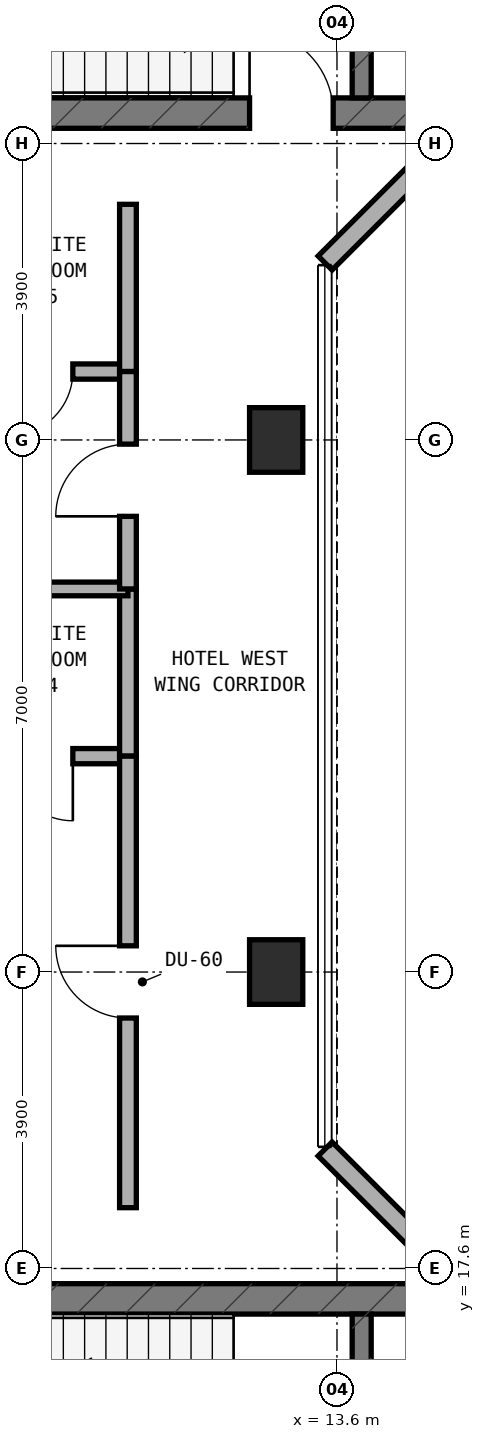
"""IFC4 building model, lengths in metres.
Left out: names, types, materials, properties, quantities, classifications, styles, units other than length and angle.
Written with IfcOpenShell. Run it as: python <this file> out.ifc"""

import sys

from ifc_helpers import new_model, si_unit, direction, frame, frame_2d, origin, origin_2d, place, context, subcontext, project, spatial, rectangle, extrude, element, fill, save


model = new_model("IFC4")
c1 = context("Model", 3, precision=1e-05, world=origin(), true_north=direction((0.0, 1.0)))
c2 = subcontext(c1, "Body", "Model", "MODEL_VIEW")
j1 = project(units=[si_unit("LENGTHUNIT", "METRE"), si_unit("PLANEANGLEUNIT", "RADIAN")], contexts=[c1])
p1 = place(None, origin())
s1 = spatial("IfcSite", under=j1, at=p1, CompositionType="ELEMENT")
p2 = place(p1, origin())
s2 = spatial("IfcBuilding", under=s1, at=p2, CompositionType="ELEMENT")
p3 = place(p2, frame((0.0, 0.0, 231.5)))
s3 = spatial("IfcBuildingStorey", under=s2, at=p3, CompositionType="ELEMENT", Elevation=231.5)
p4 = place(p3, frame((6.4, 32.8, 0.0), z_axis=(0.0, 0.0, 1.0), x_axis=(1.0, 0.0, 0.0)))
e1 = element("IfcWall", 1, at=p4, inside=s3, PredefinedType="SHEAR", context=c2, shape_type="SweptSolid", body=[
    extrude(rectangle(XDim=24.4, YDim=0.4, at=frame_2d((12.2, 0.0))), origin(), (0.0, 0.0, 1.0), 3.6),
])
p5 = place(p4, frame((6.05, 0.0, 0.0)))
e2 = element("IfcOpeningElement", 2, at=p5, cuts=e1, PredefinedType="OPENING", context=c2, shape_type="SweptSolid", body=[
    extrude(rectangle(XDim=1.1, YDim=2.15, at=frame_2d((0.55, 1.075))), frame((0.0, 0.21, 0.0), z_axis=(0.0, -1.0, 0.0), x_axis=(1.0, 0.0, 0.0)), (0.0, 0.0, 1.0), 0.42),
])
p6 = place(p3, frame((13.925, 33.0, 0.0), z_axis=(0.0, 0.0, 1.0), x_axis=(0.0, 1.0, 0.0)))
e3 = element("IfcWall", 3, at=p6, inside=s3, PredefinedType="STANDARD", context=c2, shape_type="SweptSolid", body=[
    extrude(rectangle(XDim=3.16, YDim=0.25, at=frame_2d((1.58, 0.0))), origin(), (0.0, 0.0, 1.0), 3.32),
])
p7 = place(p6, frame((0.98, 0.0, 0.0)))
e4 = element("IfcOpeningElement", 4, at=p7, cuts=e3, PredefinedType="OPENING", context=c2, shape_type="SweptSolid", body=[
    extrude(rectangle(XDim=1.1, YDim=2.15, at=frame_2d((0.55, 1.075))), frame((0.0, 0.135, 0.0), z_axis=(0.0, -1.0, 0.0), x_axis=(1.0, 0.0, 0.0)), (0.0, 0.0, 1.0), 0.27),
])
p8 = place(p3, frame((6.4, 17.2, 0.0), z_axis=(0.0, 0.0, 1.0), x_axis=(1.0, 0.0, 0.0)))
e5 = element("IfcWall", 5, at=p8, inside=s3, PredefinedType="SHEAR", context=c2, shape_type="SweptSolid", body=[
    extrude(rectangle(XDim=24.4, YDim=0.4, at=frame_2d((12.2, 0.0))), origin(), (0.0, 0.0, 1.0), 3.6),
])
p9 = place(p3, frame((13.925, 13.84, 0.0), z_axis=(0.0, 0.0, 1.0), x_axis=(0.0, 1.0, 0.0)))
e6 = element("IfcWall", 6, at=p9, inside=s3, PredefinedType="STANDARD", context=c2, shape_type="SweptSolid", body=[
    extrude(rectangle(XDim=3.16, YDim=0.25, at=frame_2d((1.58, 0.0))), origin(), (0.0, 0.0, 1.0), 3.32),
])
p10 = place(p9, frame((0.98, 0.0, 0.0)))
e7 = element("IfcOpeningElement", 7, at=p10, cuts=e6, PredefinedType="OPENING", context=c2, shape_type="SweptSolid", body=[
    extrude(rectangle(XDim=1.1, YDim=2.15, at=frame_2d((0.55, 1.075))), frame((0.0, 0.135, 0.0), z_axis=(0.0, -1.0, 0.0), x_axis=(1.0, 0.0, 0.0)), (0.0, 0.0, 1.0), 0.27),
])
for number, where, z_axis, x_axis in (
    (8, (12.8, 21.5, 0.0), (0.0, 0.0, 1.0), (1.0, 0.0, 0.0)),
    (9, (12.8, 28.5, 0.0), (0.0, 0.0, 1.0), (1.0, 0.0, 0.0)),
):
    element("IfcColumn", number, at=place(p3, frame(where, z_axis=z_axis, x_axis=x_axis)), inside=s3, PredefinedType="COLUMN", context=c2, shape_type="SweptSolid", body=[
        extrude(rectangle(XDim=0.7, YDim=0.85, at=origin_2d()), origin(), (0.0, 0.0, 1.0), 3.6),
    ])
for number, where, z_axis, x_axis in (
    (10, (15.278, 32.662, 0.0), (0.0, 0.0, 1.0), (-0.707, -0.707, 0.0)),
    (11, (13.444, 19.172, 0.0), (0.0, 0.0, 1.0), (0.707, -0.707, 0.0)),
):
    element("IfcWall", number, at=place(p3, frame(where, z_axis=z_axis, x_axis=x_axis)), inside=s3, PredefinedType="STANDARD", context=c2, shape_type="SweptSolid", body=[
        extrude(rectangle(XDim=2.594, YDim=0.26, at=frame_2d((1.297, 0.0))), origin(), (0.0, 0.0, 1.0), 3.32),
    ])
p11 = place(p3, frame((8.65, 24.34, 0.0), z_axis=(0.0, 0.0, 1.0), x_axis=(1.0, 0.0, 0.0)))
e12 = element("IfcWall", 12, at=p11, inside=s3, PredefinedType="PLUMBINGWALL", context=c2, shape_type="SweptSolid", body=[
    extrude(rectangle(XDim=2.1, YDim=0.2, at=frame_2d((1.05, 0.0))), origin(), (0.0, 0.0, 1.0), 3.32),
])
p12 = place(p11, frame((0.625, 0.0, 0.0)))
e13 = element("IfcOpeningElement", 13, at=p12, cuts=e12, PredefinedType="OPENING", context=c2, shape_type="SweptSolid", body=[
    extrude(rectangle(XDim=0.85, YDim=2.1, at=frame_2d((0.425, 1.05))), frame((0.0, 0.11, 0.0), z_axis=(0.0, -1.0, 0.0), x_axis=(1.0, 0.0, 0.0)), (0.0, 0.0, 1.0), 0.22),
])
p13 = place(p3, frame((10.85, 24.34, 0.0), z_axis=(0.0, 0.0, 1.0), x_axis=(0.0, 1.0, 0.0)))
e14 = element("IfcWall", 14, at=p13, inside=s3, PredefinedType="SOLIDWALL", context=c2, shape_type="SweptSolid", body=[
    extrude(rectangle(XDim=2.2, YDim=0.22, at=frame_2d((1.1, 0.0))), origin(), (0.0, 0.0, 1.0), 3.32),
])
p14 = place(p3, frame((10.85, 18.4, 0.0), z_axis=(0.0, 0.0, 1.0), x_axis=(0.0, 1.0, 0.0)))
e15 = element("IfcWall", 15, at=p14, inside=s3, PredefinedType="SOLIDWALL", context=c2, shape_type="SweptSolid", body=[
    extrude(rectangle(XDim=5.94, YDim=0.22, at=frame_2d((2.97, 0.0))), origin(), (0.0, 0.0, 1.0), 2.745),
])
p15 = place(p14, frame((2.495, 0.0, 0.0)))
e16 = element("IfcOpeningElement", 16, at=p15, cuts=e15, PredefinedType="OPENING", context=c2, shape_type="SweptSolid", body=[
    extrude(rectangle(XDim=0.95, YDim=2.1, at=frame_2d((0.475, 1.05))), frame((0.0, 0.12, 0.0), z_axis=(0.0, -1.0, 0.0), x_axis=(1.0, 0.0, 0.0)), (0.0, 0.0, 1.0), 0.24),
])
p16 = place(p3, frame((1.86, 26.54, 0.0), z_axis=(0.0, 0.0, 1.0), x_axis=(1.0, 0.0, 0.0)))
e17 = element("IfcWall", 17, at=p16, inside=s3, PredefinedType="SOLIDWALL", context=c2, shape_type="SweptSolid", body=[
    extrude(rectangle(XDim=8.99, YDim=0.18, at=frame_2d((4.495, 0.0))), origin(), (0.0, 0.0, 1.0), 3.015),
])
p17 = place(p3, frame((8.65, 29.4, 0.0), z_axis=(0.0, 0.0, 1.0), x_axis=(1.0, 0.0, 0.0)))
e18 = element("IfcWall", 18, at=p17, inside=s3, PredefinedType="PLUMBINGWALL", context=c2, shape_type="SweptSolid", body=[
    extrude(rectangle(XDim=2.1, YDim=0.2, at=frame_2d((1.05, 0.0))), origin(), (0.0, 0.0, 1.0), 3.32),
])
p18 = place(p17, frame((0.625, 0.0, 0.0)))
e19 = element("IfcOpeningElement", 19, at=p18, cuts=e18, PredefinedType="OPENING", context=c2, shape_type="SweptSolid", body=[
    extrude(rectangle(XDim=0.85, YDim=2.1, at=frame_2d((0.425, 1.05))), frame((0.0, 0.11, 0.0), z_axis=(0.0, -1.0, 0.0), x_axis=(1.0, 0.0, 0.0)), (0.0, 0.0, 1.0), 0.22),
])
p19 = place(p3, frame((10.85, 29.4, 0.0), z_axis=(0.0, 0.0, 1.0), x_axis=(0.0, 1.0, 0.0)))
e20 = element("IfcWall", 20, at=p19, inside=s3, PredefinedType="SOLIDWALL", context=c2, shape_type="SweptSolid", body=[
    extrude(rectangle(XDim=2.2, YDim=0.22, at=frame_2d((1.1, 0.0))), origin(), (0.0, 0.0, 1.0), 3.32),
])
p20 = place(p3, frame((10.85, 26.54, 0.0), z_axis=(0.0, 0.0, 1.0), x_axis=(0.0, 1.0, 0.0)))
e21 = element("IfcWall", 21, at=p20, inside=s3, PredefinedType="SOLIDWALL", context=c2, shape_type="SweptSolid", body=[
    extrude(rectangle(XDim=2.86, YDim=0.22, at=frame_2d((1.43, 0.0))), origin(), (0.0, 0.0, 1.0), 2.745),
])
p21 = place(p20, frame((0.955, 0.0, 0.0)))
e22 = element("IfcOpeningElement", 22, at=p21, cuts=e21, PredefinedType="OPENING", context=c2, shape_type="SweptSolid", body=[
    extrude(rectangle(XDim=0.95, YDim=2.1, at=frame_2d((0.475, 1.05))), frame((0.0, 0.12, 0.0), z_axis=(0.0, -1.0, 0.0), x_axis=(1.0, 0.0, 0.0)), (0.0, 0.0, 1.0), 0.24),
])
p22 = place(p5, origin())
e23 = element("IfcDoor", 23, at=p22, inside=s3, OperationType="SINGLE_SWING_LEFT", PredefinedType="DOOR", context=c2, shape_type="SweptSolid", body=[
    extrude(rectangle(XDim=1.1, YDim=2.15, at=frame_2d((0.55, 1.075))), frame((0.0, 0.025, 0.0), z_axis=(0.0, -1.0, 0.0), x_axis=(1.0, 0.0, 0.0)), (0.0, 0.0, 1.0), 0.05),
])
fill(e2, e23)
p23 = place(p12, frame((0.85, 0.0, 0.0), z_axis=(0.0, 0.0, 1.0), x_axis=(-1.0, 0.0, 0.0)))
e24 = element("IfcDoor", 24, at=p23, inside=s3, OperationType="SINGLE_SWING_LEFT", PredefinedType="DOOR", context=c2, shape_type="SweptSolid", body=[
    extrude(rectangle(XDim=0.85, YDim=2.1, at=frame_2d((0.425, 1.05))), frame((0.0, 0.025, 0.0), z_axis=(0.0, -1.0, 0.0), x_axis=(1.0, 0.0, 0.0)), (0.0, 0.0, 1.0), 0.05),
])
fill(e13, e24)
p24 = place(p15, origin())
e25 = element("IfcDoor", 25, at=p24, inside=s3, OperationType="SINGLE_SWING_RIGHT", PredefinedType="DOOR", context=c2, shape_type="SweptSolid", body=[
    extrude(rectangle(XDim=0.95, YDim=2.1, at=frame_2d((0.475, 1.05))), frame((0.0, 0.025, 0.0), z_axis=(0.0, -1.0, 0.0), x_axis=(1.0, 0.0, 0.0)), (0.0, 0.0, 1.0), 0.05),
])
fill(e16, e25)
p25 = place(p18, frame((0.85, 0.0, 0.0), z_axis=(0.0, 0.0, 1.0), x_axis=(-1.0, 0.0, 0.0)))
e26 = element("IfcDoor", 26, at=p25, inside=s3, OperationType="SINGLE_SWING_RIGHT", PredefinedType="DOOR", context=c2, shape_type="SweptSolid", body=[
    extrude(rectangle(XDim=0.85, YDim=2.1, at=frame_2d((0.425, 1.05))), frame((0.0, 0.025, 0.0), z_axis=(0.0, -1.0, 0.0), x_axis=(1.0, 0.0, 0.0)), (0.0, 0.0, 1.0), 0.05),
])
fill(e19, e26)
p26 = place(p21, origin())
e27 = element("IfcDoor", 27, at=p26, inside=s3, OperationType="SINGLE_SWING_LEFT", PredefinedType="DOOR", context=c2, shape_type="SweptSolid", body=[
    extrude(rectangle(XDim=0.95, YDim=2.1, at=frame_2d((0.475, 1.05))), frame((0.0, 0.025, 0.0), z_axis=(0.0, -1.0, 0.0), x_axis=(1.0, 0.0, 0.0)), (0.0, 0.0, 1.0), 0.05),
])
fill(e22, e27)
save(model, sys.argv[1])
